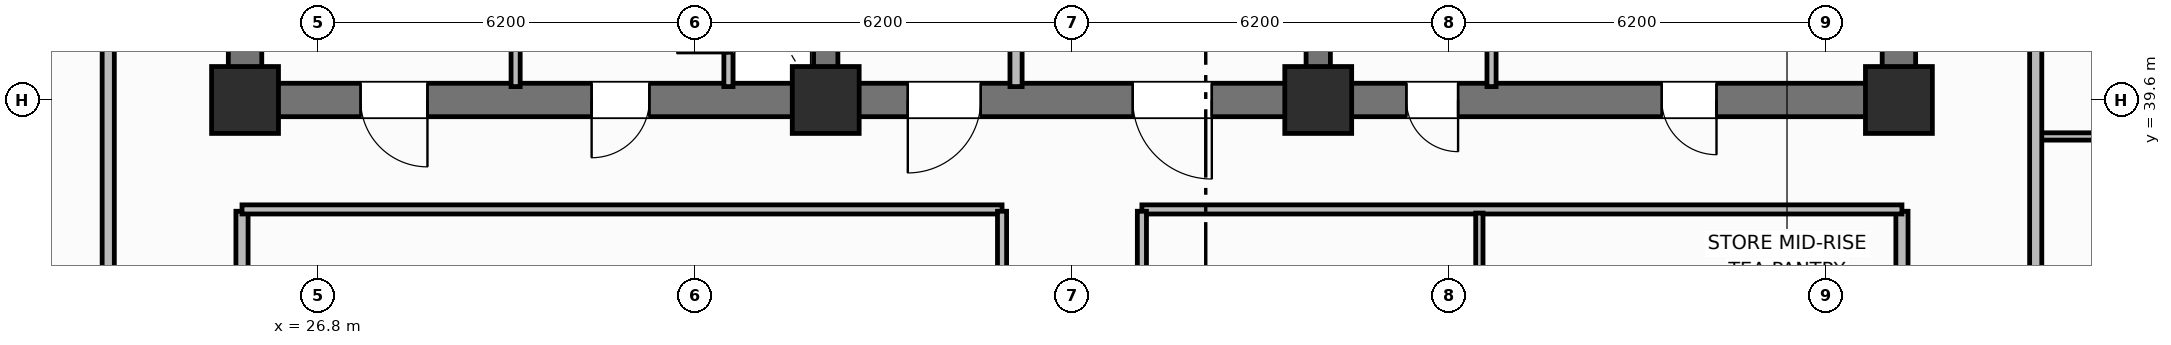
"""IFC4 building model, lengths in metres.
Left out: names, types, materials, properties, quantities, classifications, styles, units other than length and angle.
Written with IfcOpenShell. Run it as: python <this file> out.ifc"""

import sys

from ifc_helpers import new_model, si_unit, direction, frame, frame_2d, origin, origin_2d, place, context, subcontext, project, spatial, rectangle, extrude, element, fill, save


model = new_model("IFC4")
c1 = context("Model", 3, precision=1e-05, world=origin(), true_north=direction((0.0, 1.0)))
c2 = subcontext(c1, "Body", "Model", "MODEL_VIEW")
j1 = project(units=[si_unit("LENGTHUNIT", "METRE"), si_unit("PLANEANGLEUNIT", "RADIAN")], contexts=[c1])
p1 = place(None, origin())
s1 = spatial("IfcSite", under=j1, at=p1, CompositionType="ELEMENT")
p2 = place(p1, origin())
s2 = spatial("IfcBuilding", under=s1, at=p2, CompositionType="ELEMENT")
p3 = place(p2, frame((0.0, 0.0, 84.1)))
s3 = spatial("IfcBuildingStorey", under=s2, at=p3, CompositionType="ELEMENT", Elevation=84.1)
for number, where, z_axis, x_axis in (
    (1, (25.6, 39.875, 0.0), (0.0, 0.0, 1.0), (0.0, 1.0, 0.0)),
    (2, (52.8, 39.875, 0.0), (0.0, 0.0, 1.0), (0.0, 1.0, 0.0)),
):
    element("IfcWall", number, at=place(p3, frame(where, z_axis=z_axis, x_axis=x_axis)), inside=s3, PredefinedType="SHEAR", context=c2, shape_type="SweptSolid", body=[
        extrude(rectangle(XDim=5.65, YDim=0.55, at=frame_2d((2.825, 0.0))), origin(), (0.0, 0.0, 1.0), 4.2),
    ])
p4 = place(p3, frame((52.8, 39.6, 0.0), z_axis=(0.0, 0.0, 1.0), x_axis=(-1.0, 0.0, 0.0)))
e3 = element("IfcWall", 3, at=p4, inside=s3, PredefinedType="SHEAR", context=c2, shape_type="SweptSolid", body=[
    extrude(rectangle(XDim=27.2, YDim=0.55, at=frame_2d((13.6, 0.0))), origin(), (0.0, 0.0, 1.0), 4.2),
])
p5 = place(p4, frame((24.2, 0.0, 0.0)))
e4 = element("IfcOpeningElement", 4, at=p5, cuts=e3, PredefinedType="OPENING", context=c2, shape_type="SweptSolid", body=[
    extrude(rectangle(XDim=1.1, YDim=2.15, at=frame_2d((0.55, 1.075))), frame((0.0, 0.285, 0.0), z_axis=(0.0, -1.0, 0.0), x_axis=(1.0, 0.0, 0.0)), (0.0, 0.0, 1.0), 0.57),
])
p6 = place(p4, frame((20.55, 0.0, 0.0)))
e5 = element("IfcOpeningElement", 5, at=p6, cuts=e3, PredefinedType="OPENING", context=c2, shape_type="SweptSolid", body=[
    extrude(rectangle(XDim=0.95, YDim=2.1, at=frame_2d((0.475, 1.05))), frame((0.0, 0.285, 0.0), z_axis=(0.0, -1.0, 0.0), x_axis=(1.0, 0.0, 0.0)), (0.0, 0.0, 1.0), 0.57),
])
p7 = place(p4, frame((15.1, 0.0, 0.0)))
e6 = element("IfcOpeningElement", 6, at=p7, cuts=e3, PredefinedType="OPENING", context=c2, shape_type="SweptSolid", body=[
    extrude(rectangle(XDim=1.2, YDim=2.15, at=frame_2d((0.6, 1.075))), frame((0.0, 0.285, 0.0), z_axis=(0.0, -1.0, 0.0), x_axis=(1.0, 0.0, 0.0)), (0.0, 0.0, 1.0), 0.57),
])
p8 = place(p4, frame((11.3, 0.0, 0.0)))
e7 = element("IfcOpeningElement", 7, at=p8, cuts=e3, PredefinedType="OPENING", context=c2, shape_type="SweptSolid", body=[
    extrude(rectangle(XDim=1.3, YDim=2.2, at=frame_2d((0.65, 1.1))), frame((0.0, 0.285, 0.0), z_axis=(0.0, -1.0, 0.0), x_axis=(1.0, 0.0, 0.0)), (0.0, 0.0, 1.0), 0.57),
])
p9 = place(p4, frame((7.25, 0.0, 0.0)))
e8 = element("IfcOpeningElement", 8, at=p9, cuts=e3, PredefinedType="OPENING", context=c2, shape_type="SweptSolid", body=[
    extrude(rectangle(XDim=0.85, YDim=2.1, at=frame_2d((0.425, 1.05))), frame((0.0, 0.285, 0.0), z_axis=(0.0, -1.0, 0.0), x_axis=(1.0, 0.0, 0.0)), (0.0, 0.0, 1.0), 0.57),
])
p10 = place(p4, frame((3.0, 0.0, 0.0)))
e9 = element("IfcOpeningElement", 9, at=p10, cuts=e3, PredefinedType="OPENING", context=c2, shape_type="SweptSolid", body=[
    extrude(rectangle(XDim=0.9, YDim=2.1, at=frame_2d((0.45, 1.05))), frame((0.0, 0.285, 0.0), z_axis=(0.0, -1.0, 0.0), x_axis=(1.0, 0.0, 0.0)), (0.0, 0.0, 1.0), 0.57),
])
for number, where, z_axis, x_axis in (
    (10, (35.15, 39.875, 0.0), (0.0, 0.0, 1.0), (0.0, 1.0, 0.0)),
    (11, (43.25, 39.875, 0.0), (0.0, 0.0, 1.0), (0.0, 1.0, 0.0)),
):
    element("IfcWall", number, at=place(p3, frame(where, z_axis=z_axis, x_axis=x_axis)), inside=s3, PredefinedType="SHEAR", context=c2, shape_type="SweptSolid", body=[
        extrude(rectangle(XDim=5.65, YDim=0.4, at=frame_2d((2.825, 0.0))), origin(), (0.0, 0.0, 1.0), 4.2),
    ])
for number, where, z_axis, x_axis in (
    (12, (25.6, 39.6, 0.0), (0.0, 0.0, 1.0), (1.0, 0.0, 0.0)),
    (13, (35.15, 39.6, 0.0), (0.0, 0.0, 1.0), (1.0, 0.0, 0.0)),
    (14, (43.25, 39.6, 0.0), (0.0, 0.0, 1.0), (1.0, 0.0, 0.0)),
    (15, (52.8, 39.6, 0.0), (0.0, 0.0, 1.0), (1.0, 0.0, 0.0)),
):
    element("IfcColumn", number, at=place(p3, frame(where, z_axis=z_axis, x_axis=x_axis)), inside=s3, PredefinedType="COLUMN", context=c2, shape_type="SweptSolid", body=[
        extrude(rectangle(XDim=1.1, YDim=1.1, at=origin_2d()), origin(), (0.0, 0.0, 1.0), 4.2),
    ])
p11 = place(p3, frame((33.55, 39.82, 0.0), z_axis=(0.0, 0.0, 1.0), x_axis=(0.0, 1.0, 0.0)))
e16 = element("IfcWall", 16, at=p11, inside=s3, PredefinedType="PARTITIONING", context=c2, shape_type="SweptSolid", body=[
    extrude(rectangle(XDim=2.13, YDim=0.15, at=frame_2d((1.065, 0.0))), origin(), (0.0, 0.0, 1.0), 3.03),
])
p12 = place(p11, frame((0.55, 0.0, 0.0)))
e17 = element("IfcOpeningElement", 17, at=p12, cuts=e16, PredefinedType="OPENING", context=c2, shape_type="SweptSolid", body=[
    extrude(rectangle(XDim=0.85, YDim=2.05, at=frame_2d((0.425, 1.025))), frame((0.0, 0.085, 0.0), z_axis=(0.0, -1.0, 0.0), x_axis=(1.0, 0.0, 0.0)), (0.0, 0.0, 1.0), 0.17),
])
p13 = place(p3, frame((30.05, 39.82, 0.0), z_axis=(0.0, 0.0, 1.0), x_axis=(0.0, 1.0, 0.0)))
e18 = element("IfcWall", 18, at=p13, inside=s3, PredefinedType="PARTITIONING", context=c2, shape_type="SweptSolid", body=[
    extrude(rectangle(XDim=2.13, YDim=0.15, at=frame_2d((1.065, 0.0))), origin(), (0.0, 0.0, 1.0), 3.03),
])
p14 = place(p3, frame((38.28, 39.82, 0.0), z_axis=(0.0, 0.0, 1.0), x_axis=(0.0, 1.0, 0.0)))
e19 = element("IfcWall", 19, at=p14, inside=s3, PredefinedType="PARTITIONING", context=c2, shape_type="SweptSolid", body=[
    extrude(rectangle(XDim=2.73, YDim=0.2, at=frame_2d((1.365, 0.0))), origin(), (0.0, 0.0, 1.0), 3.03),
])
p15 = place(p3, frame((46.1, 39.82, 0.0), z_axis=(0.0, 0.0, 1.0), x_axis=(0.0, 1.0, 0.0)))
e20 = element("IfcWall", 20, at=p15, inside=s3, PredefinedType="PARTITIONING", context=c2, shape_type="SweptSolid", body=[
    extrude(rectangle(XDim=2.73, YDim=0.15, at=frame_2d((1.365, 0.0))), origin(), (0.0, 0.0, 1.0), 3.03),
])
for number, where, z_axis, x_axis in (
    (21, (25.55, 18.63, 0.0), (0.0, 0.0, 1.0), (0.0, 1.0, 0.0)),
    (22, (52.85, 18.63, 0.0), (0.0, 0.0, 1.0), (0.0, 1.0, 0.0)),
):
    element("IfcWall", number, at=place(p3, frame(where, z_axis=z_axis, x_axis=x_axis)), inside=s3, PredefinedType="PARTITIONING", context=c2, shape_type="SweptSolid", body=[
        extrude(rectangle(XDim=19.14, YDim=0.2, at=frame_2d((9.57, 0.0))), origin(), (0.0, 0.0, 1.0), 3.03),
    ])
for number, where, z_axis, x_axis in (
    (23, (25.55, 37.8, 0.0), (0.0, 0.0, 1.0), (1.0, 0.0, 0.0)),
    (24, (40.35, 37.8, 0.0), (0.0, 0.0, 1.0), (1.0, 0.0, 0.0)),
):
    element("IfcWall", number, at=place(p3, frame(where, z_axis=z_axis, x_axis=x_axis)), inside=s3, PredefinedType="PARTITIONING", context=c2, shape_type="SweptSolid", body=[
        extrude(rectangle(XDim=12.5, YDim=0.15, at=frame_2d((6.25, 0.0))), origin(), (0.0, 0.0, 1.0), 3.03),
    ])
p16 = place(p3, frame((45.9, 25.57, 0.0), z_axis=(0.0, 0.0, 1.0), x_axis=(0.0, 1.0, 0.0)))
e25 = element("IfcWall", 25, at=p16, inside=s3, PredefinedType="PARTITIONING", context=c2, shape_type="SweptSolid", body=[
    extrude(rectangle(XDim=12.17, YDim=0.12, at=frame_2d((6.085, 0.0))), origin(), (0.0, 0.0, 1.0), 3.03),
])
p17 = place(p16, frame((2.0, 0.0, 0.0)))
e26 = element("IfcOpeningElement", 26, at=p17, cuts=e25, PredefinedType="OPENING", context=c2, shape_type="SweptSolid", body=[
    extrude(rectangle(XDim=0.85, YDim=2.1, at=frame_2d((0.425, 1.05))), frame((0.0, 0.07, 0.0), z_axis=(0.0, -1.0, 0.0), x_axis=(1.0, 0.0, 0.0)), (0.0, 0.0, 1.0), 0.14),
])
p18 = place(p3, frame((38.05, 18.63, 0.0), z_axis=(0.0, 0.0, 1.0), x_axis=(0.0, 1.0, 0.0)))
e27 = element("IfcWall", 27, at=p18, inside=s3, PredefinedType="PARTITIONING", context=c2, shape_type="SweptSolid", body=[
    extrude(rectangle(XDim=19.14, YDim=0.15, at=frame_2d((9.57, 0.0))), origin(), (0.0, 0.0, 1.0), 3.03),
])
p19 = place(p18, frame((4.0, 0.0, 0.0)))
e28 = element("IfcOpeningElement", 28, at=p19, cuts=e27, PredefinedType="OPENING", context=c2, shape_type="SweptSolid", body=[
    extrude(rectangle(XDim=1.3, YDim=2.2, at=frame_2d((0.65, 1.1))), frame((0.0, 0.085, 0.0), z_axis=(0.0, -1.0, 0.0), x_axis=(1.0, 0.0, 0.0)), (0.0, 0.0, 1.0), 0.17),
])
p20 = place(p3, frame((40.35, 18.63, 0.0), z_axis=(0.0, 0.0, 1.0), x_axis=(0.0, 1.0, 0.0)))
e29 = element("IfcWall", 29, at=p20, inside=s3, PredefinedType="PARTITIONING", context=c2, shape_type="SweptSolid", body=[
    extrude(rectangle(XDim=19.14, YDim=0.15, at=frame_2d((9.57, 0.0))), origin(), (0.0, 0.0, 1.0), 3.03),
])
p21 = place(p20, frame((2.2, 0.0, 0.0)))
e30 = element("IfcOpeningElement", 30, at=p21, cuts=e29, PredefinedType="OPENING", context=c2, shape_type="SweptSolid", body=[
    extrude(rectangle(XDim=1.0, YDim=2.15, at=frame_2d((0.5, 1.075))), frame((0.0, 0.085, 0.0), z_axis=(0.0, -1.0, 0.0), x_axis=(1.0, 0.0, 0.0)), (0.0, 0.0, 1.0), 0.17),
])
p22 = place(p20, frame((8.69, 0.0, 0.0)))
e31 = element("IfcOpeningElement", 31, at=p22, cuts=e29, PredefinedType="OPENING", context=c2, shape_type="SweptSolid", body=[
    extrude(rectangle(XDim=0.95, YDim=2.1, at=frame_2d((0.475, 1.05))), frame((0.0, 0.085, 0.0), z_axis=(0.0, -1.0, 0.0), x_axis=(1.0, 0.0, 0.0)), (0.0, 0.0, 1.0), 0.17),
])
p23 = place(p3, frame((23.35, 10.6, 0.0), z_axis=(0.0, 0.0, 1.0), x_axis=(0.0, 1.0, 0.0)))
e32 = element("IfcWall", 32, at=p23, inside=s3, PredefinedType="PARTITIONING", context=c2, shape_type="SweptSolid", body=[
    extrude(rectangle(XDim=35.2, YDim=0.2, at=frame_2d((17.6, 0.0))), origin(), (0.0, 0.0, 1.0), 3.03),
])
p24 = place(p23, frame((2.65, 0.0, 0.0)))
e33 = element("IfcOpeningElement", 33, at=p24, cuts=e32, PredefinedType="OPENING", context=c2, shape_type="SweptSolid", body=[
    extrude(rectangle(XDim=1.0, YDim=2.15, at=frame_2d((0.5, 1.075))), frame((0.0, 0.11, 0.0), z_axis=(0.0, -1.0, 0.0), x_axis=(1.0, 0.0, 0.0)), (0.0, 0.0, 1.0), 0.22),
])
p25 = place(p23, frame((19.95, 0.0, 0.0)))
e34 = element("IfcOpeningElement", 34, at=p25, cuts=e32, PredefinedType="OPENING", context=c2, shape_type="SweptSolid", body=[
    extrude(rectangle(XDim=1.0, YDim=2.15, at=frame_2d((0.5, 1.075))), frame((0.0, 0.11, 0.0), z_axis=(0.0, -1.0, 0.0), x_axis=(1.0, 0.0, 0.0)), (0.0, 0.0, 1.0), 0.22),
])
p26 = place(p3, frame((55.05, 39.0, 0.0), z_axis=(0.0, 0.0, 1.0), x_axis=(1.0, 0.0, 0.0)))
e35 = element("IfcWall", 35, at=p26, inside=s3, PredefinedType="PARTITIONING", context=c2, shape_type="SweptSolid", body=[
    extrude(rectangle(XDim=2.25, YDim=0.12, at=frame_2d((1.125, 0.0))), origin(), (0.0, 0.0, 1.0), 3.03),
])
p27 = place(p3, frame((55.05, 10.6, 0.0), z_axis=(0.0, 0.0, 1.0), x_axis=(0.0, 1.0, 0.0)))
e36 = element("IfcWall", 36, at=p27, inside=s3, PredefinedType="PARTITIONING", context=c2, shape_type="SweptSolid", body=[
    extrude(rectangle(XDim=35.2, YDim=0.2, at=frame_2d((17.6, 0.0))), origin(), (0.0, 0.0, 1.0), 3.03),
])
p28 = place(p27, frame((2.65, 0.0, 0.0)))
e37 = element("IfcOpeningElement", 37, at=p28, cuts=e36, PredefinedType="OPENING", context=c2, shape_type="SweptSolid", body=[
    extrude(rectangle(XDim=1.0, YDim=2.15, at=frame_2d((0.5, 1.075))), frame((0.0, 0.11, 0.0), z_axis=(0.0, -1.0, 0.0), x_axis=(1.0, 0.0, 0.0)), (0.0, 0.0, 1.0), 0.22),
])
p29 = place(p27, frame((22.75, 0.0, 0.0)))
e38 = element("IfcOpeningElement", 38, at=p29, cuts=e36, PredefinedType="OPENING", context=c2, shape_type="SweptSolid", body=[
    extrude(rectangle(XDim=1.0, YDim=2.15, at=frame_2d((0.5, 1.075))), frame((0.0, 0.11, 0.0), z_axis=(0.0, -1.0, 0.0), x_axis=(1.0, 0.0, 0.0)), (0.0, 0.0, 1.0), 0.22),
])
p30 = place(p12, origin())
e39 = element("IfcDoor", 39, at=p30, inside=s3, OperationType="SINGLE_SWING_LEFT", PredefinedType="TRAPDOOR", context=c2, shape_type="SweptSolid", body=[
    extrude(rectangle(XDim=0.85, YDim=2.05, at=frame_2d((0.425, 1.025))), frame((0.0, 0.025, 0.0), z_axis=(0.0, -1.0, 0.0), x_axis=(1.0, 0.0, 0.0)), (0.0, 0.0, 1.0), 0.05),
])
fill(e17, e39)
p31 = place(p5, origin())
e40 = element("IfcDoor", 40, at=p31, inside=s3, OperationType="SINGLE_SWING_LEFT", PredefinedType="DOOR", context=c2, shape_type="SweptSolid", body=[
    extrude(rectangle(XDim=1.1, YDim=2.15, at=frame_2d((0.55, 1.075))), frame((0.0, 0.025, 0.0), z_axis=(0.0, -1.0, 0.0), x_axis=(1.0, 0.0, 0.0)), (0.0, 0.0, 1.0), 0.05),
])
fill(e4, e40)
p32 = place(p6, origin())
e41 = element("IfcDoor", 41, at=p32, inside=s3, OperationType="SINGLE_SWING_RIGHT", PredefinedType="DOOR", context=c2, shape_type="SweptSolid", body=[
    extrude(rectangle(XDim=0.95, YDim=2.1, at=frame_2d((0.475, 1.05))), frame((0.0, 0.025, 0.0), z_axis=(0.0, -1.0, 0.0), x_axis=(1.0, 0.0, 0.0)), (0.0, 0.0, 1.0), 0.05),
])
fill(e5, e41)
p33 = place(p7, origin())
e42 = element("IfcDoor", 42, at=p33, inside=s3, OperationType="SINGLE_SWING_RIGHT", PredefinedType="DOOR", context=c2, shape_type="SweptSolid", body=[
    extrude(rectangle(XDim=1.2, YDim=2.15, at=frame_2d((0.6, 1.075))), frame((0.0, 0.025, 0.0), z_axis=(0.0, -1.0, 0.0), x_axis=(1.0, 0.0, 0.0)), (0.0, 0.0, 1.0), 0.05),
])
fill(e6, e42)
p34 = place(p8, origin())
e43 = element("IfcDoor", 43, at=p34, inside=s3, OperationType="SINGLE_SWING_LEFT", PredefinedType="DOOR", context=c2, shape_type="SweptSolid", body=[
    extrude(rectangle(XDim=1.3, YDim=2.2, at=frame_2d((0.65, 1.1))), frame((0.0, 0.025, 0.0), z_axis=(0.0, -1.0, 0.0), x_axis=(1.0, 0.0, 0.0)), (0.0, 0.0, 1.0), 0.05),
])
fill(e7, e43)
p35 = place(p9, origin())
e44 = element("IfcDoor", 44, at=p35, inside=s3, OperationType="SINGLE_SWING_LEFT", PredefinedType="DOOR", context=c2, shape_type="SweptSolid", body=[
    extrude(rectangle(XDim=0.85, YDim=2.1, at=frame_2d((0.425, 1.05))), frame((0.0, 0.025, 0.0), z_axis=(0.0, -1.0, 0.0), x_axis=(1.0, 0.0, 0.0)), (0.0, 0.0, 1.0), 0.05),
])
fill(e8, e44)
p36 = place(p10, origin())
e45 = element("IfcDoor", 45, at=p36, inside=s3, OperationType="SINGLE_SWING_LEFT", PredefinedType="DOOR", context=c2, shape_type="SweptSolid", body=[
    extrude(rectangle(XDim=0.9, YDim=2.1, at=frame_2d((0.45, 1.05))), frame((0.0, 0.025, 0.0), z_axis=(0.0, -1.0, 0.0), x_axis=(1.0, 0.0, 0.0)), (0.0, 0.0, 1.0), 0.05),
])
fill(e9, e45)
save(model, sys.argv[1])
